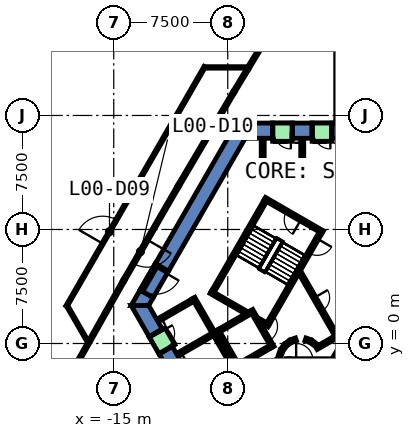
"""IFC4 building model, lengths in metres.
Left out: names, types, materials, properties, quantities, classifications, styles, units other than length and angle.
Written with IfcOpenShell. Run it as: python <this file> out.ifc"""

import sys

from ifc_helpers import new_model, si_unit, direction, frame, frame_2d, origin, place, context, subcontext, project, spatial, polyline, rectangle, outline, extrude, element, fill, save


model = new_model("IFC4")
c1 = context("Model", 3, precision=1e-05, world=origin(), true_north=direction((0.0, 1.0)))
c2 = subcontext(c1, "Body", "Model", "MODEL_VIEW")
j1 = project(units=[si_unit("LENGTHUNIT", "METRE"), si_unit("PLANEANGLEUNIT", "RADIAN")], contexts=[c1])
p1 = place(None, origin())
s1 = spatial("IfcSite", under=j1, at=p1, CompositionType="ELEMENT")
p2 = place(p1, origin())
s2 = spatial("IfcBuilding", under=s1, at=p2, CompositionType="ELEMENT")
p3 = place(p2, origin())
s3 = spatial("IfcBuildingStorey", under=s2, at=p3, CompositionType="ELEMENT", Elevation=0.0)
p4 = place(p3, frame((0.0, 0.0, -0.5)))
e1 = element("IfcWall", 1, at=p4, inside=s3, PredefinedType="SHEAR", context=c2, shape_type="SweptSolid", body=[
    extrude(outline(polyline([(-0.65, 14.5), (-0.65, 13.5), (0.65, 13.5), (0.65, 14.5), (-0.65, 14.5)])), origin(), (0.0, 0.0, 1.0), 9.05),
])
p5 = place(p3, frame((0.0, 0.0, -0.5)))
e2 = element("IfcWall", 2, at=p5, inside=s3, PredefinedType="SHEAR", context=c2, shape_type="SweptSolid", body=[
    extrude(outline(polyline([(-3.25, 14.5), (-3.25, 13.5), (-1.95, 13.5), (-1.95, 14.5), (-3.25, 14.5)])), origin(), (0.0, 0.0, 1.0), 9.05),
])
p6 = place(p3, frame((0.0, 0.0, -0.5)))
e3 = element("IfcWall", 3, at=p6, inside=s3, PredefinedType="SHEAR", context=c2, shape_type="SweptSolid", body=[
    extrude(outline(polyline([(-4.55, 13.5), (-4.55, 14.5), (-6.928, 14.5), (-6.351, 13.5), (-4.55, 13.5)])), origin(), (0.0, 0.0, 1.0), 9.05),
])
p7 = place(p3, frame((0.0, 0.0, 3.6)))
e4 = element("IfcWall", 4, at=p7, inside=s3, PredefinedType="SHEAR", context=c2, shape_type="SweptSolid", body=[
    extrude(outline(polyline([(-1.95, 14.5), (-1.95, 13.5), (-0.65, 13.5), (-0.65, 14.5), (-1.95, 14.5)])), origin(), (0.0, 0.0, 1.0), 4.95),
])
p8 = place(p3, frame((0.0, 0.0, 3.6)))
e5 = element("IfcWall", 5, at=p8, inside=s3, PredefinedType="SHEAR", context=c2, shape_type="SweptSolid", body=[
    extrude(outline(polyline([(-4.55, 14.5), (-4.55, 13.5), (-3.25, 13.5), (-3.25, 14.5), (-4.55, 14.5)])), origin(), (0.0, 0.0, 1.0), 4.95),
])
p9 = place(p3, frame((0.0, 0.0, -0.5)))
e6 = element("IfcWall", 6, at=p9, inside=s3, PredefinedType="SHEAR", context=c2, shape_type="SweptSolid", body=[
    extrude(outline(polyline([(-12.267, 5.252), (-11.402, 4.752), (-6.351, 13.5), (-6.928, 14.5), (-12.267, 5.252)])), origin(), (0.0, 0.0, 1.0), 9.05),
])
p10 = place(p3, frame((0.0, 0.0, -0.5)))
e7 = element("IfcWall", 7, at=p10, inside=s3, PredefinedType="SHEAR", context=c2, shape_type="SweptSolid", body=[
    extrude(outline(polyline([(-12.402, 3.02), (-13.267, 3.52), (-13.856, 2.5), (-12.702, 2.5), (-12.402, 3.02)])), origin(), (0.0, 0.0, 1.0), 9.05),
])
p11 = place(p3, frame((0.0, 0.0, 3.6)))
e8 = element("IfcWall", 8, at=p11, inside=s3, PredefinedType="SHEAR", context=c2, shape_type="SweptSolid", body=[
    extrude(outline(polyline([(-13.267, 3.52), (-12.402, 3.02), (-11.402, 4.752), (-12.267, 5.252), (-13.267, 3.52)])), origin(), (0.0, 0.0, 1.0), 4.95),
])
p12 = place(p3, frame((0.0, 0.0, -0.5)))
e9 = element("IfcWall", 9, at=p12, inside=s3, PredefinedType="SHEAR", context=c2, shape_type="SweptSolid", body=[
    extrude(outline(polyline([(-12.667, 0.44), (-11.801, 0.94), (-12.702, 2.5), (-13.856, 2.5), (-12.667, 0.44)])), origin(), (0.0, 0.0, 1.0), 9.05),
])
p13 = place(p3, frame((0.0, 0.0, -0.5)))
e10 = element("IfcWall", 10, at=p13, inside=s3, PredefinedType="SHEAR", context=c2, shape_type="SweptSolid", body=[
    extrude(outline(polyline([(-11.367, -1.811), (-10.501, -1.311), (-11.151, -0.186), (-12.017, -0.686), (-11.367, -1.811)])), origin(), (0.0, 0.0, 1.0), 9.05),
])
p14 = place(p3, frame((0.0, 0.0, 3.6)))
e11 = element("IfcWall", 11, at=p14, inside=s3, PredefinedType="SHEAR", context=c2, shape_type="SweptSolid", body=[
    extrude(outline(polyline([(-12.017, -0.686), (-11.151, -0.186), (-11.801, 0.94), (-12.667, 0.44), (-12.017, -0.686)])), origin(), (0.0, 0.0, 1.0), 4.95),
])
p15 = place(p3, frame((-5.126, -2.422, 0.0), z_axis=(0.0, 0.0, 1.0), x_axis=(-0.500062241894, 0.865989465428, 0.0)))
e12 = element("IfcWall", 12, at=p15, inside=s3, PredefinedType="PARTITIONING", context=c2, shape_type="SweptSolid", body=[
    extrude(rectangle(XDim=1.7, YDim=0.2, at=frame_2d((0.85, 0.0))), origin(), (0.0, 0.0, 1.0), 8.55),
])
p16 = place(p3, frame((-4.145, -0.92, 0.0), z_axis=(0.0, 0.0, 1.0), x_axis=(0.499743786207, -0.866173278362, 0.0)))
e13 = element("IfcWall", 13, at=p16, inside=s3, PredefinedType="PARTITIONING", context=c2, shape_type="SweptSolid", body=[
    extrude(rectangle(XDim=0.991, YDim=0.2, at=frame_2d((0.495, 0.0))), origin(), (0.0, 0.0, 1.0), 8.55),
])
p17 = place(p3, frame((-0.52, -1.0, 0.0), z_axis=(0.0, 0.0, 1.0), x_axis=(0.50011622646, 0.865958290007, 0.0)))
e14 = element("IfcWall", 14, at=p17, inside=s3, PredefinedType="PARTITIONING", context=c2, shape_type="SweptSolid", body=[
    extrude(rectangle(XDim=4.991, YDim=0.2, at=frame_2d((2.496, 0.0))), origin(), (0.0, 0.0, 1.0), 8.55),
])
p18 = place(p17, frame((1.945, 0.0, 0.0)))
e15 = element("IfcOpeningElement", 15, at=p18, cuts=e14, PredefinedType="OPENING", context=c2, shape_type="SweptSolid", body=[
    extrude(rectangle(XDim=1.0, YDim=2.1, at=frame_2d((0.5, 1.05))), frame((0.0, 0.11, 0.0), z_axis=(0.0, -1.0, 0.0), x_axis=(1.0, 0.0, 0.0)), (0.0, 0.0, 1.0), 0.22),
])
p19 = place(p3, frame((-0.412, 0.414, 0.0), z_axis=(0.0, 0.0, 1.0), x_axis=(-0.866017369001, -0.500013916395, 0.0)))
e16 = element("IfcWall", 16, at=p19, inside=s3, PredefinedType="PARTITIONING", context=c2, shape_type="SweptSolid", body=[
    extrude(rectangle(XDim=1.45, YDim=0.2, at=frame_2d((0.725, 0.0))), origin(), (0.0, 0.0, 1.0), 8.55),
])
p20 = place(p3, frame((-1.731, -0.077, 0.0), z_axis=(0.0, 0.0, 1.0), x_axis=(-0.804311165252, 0.594208338422, 0.0)))
e17 = element("IfcWall", 17, at=p20, inside=s3, PredefinedType="PARTITIONING", context=c2, shape_type="SweptSolid", body=[
    extrude(rectangle(XDim=0.338, YDim=0.2, at=frame_2d((0.169, 0.0))), origin(), (0.0, 0.0, 1.0), 8.55),
])
p21 = place(p3, frame((-2.07, 0.16, 0.0), z_axis=(0.0, 0.0, 1.0), x_axis=(-0.942199461132, 0.335052496547, 0.0)))
e18 = element("IfcWall", 18, at=p21, inside=s3, PredefinedType="PARTITIONING", context=c2, shape_type="SweptSolid", body=[
    extrude(rectangle(XDim=0.337, YDim=0.2, at=frame_2d((0.169, 0.0))), origin(), (0.0, 0.0, 1.0), 8.55),
])
p22 = place(p3, frame((-3.012, 0.273, 0.0), z_axis=(0.0, 0.0, 1.0), x_axis=(-0.942280615813, -0.334824194261, 0.0)))
e19 = element("IfcWall", 19, at=p22, inside=s3, PredefinedType="PARTITIONING", context=c2, shape_type="SweptSolid", body=[
    extrude(rectangle(XDim=0.338, YDim=0.2, at=frame_2d((0.169, 0.0))), origin(), (0.0, 0.0, 1.0), 8.55),
])
p23 = place(p3, frame((-3.397, 0.124, 0.0), z_axis=(0.0, 0.0, 1.0), x_axis=(-0.804311165252, -0.594208338422, 0.0)))
e20 = element("IfcWall", 20, at=p23, inside=s3, PredefinedType="PARTITIONING", context=c2, shape_type="SweptSolid", body=[
    extrude(rectangle(XDim=0.338, YDim=0.2, at=frame_2d((0.169, 0.0))), origin(), (0.0, 0.0, 1.0), 8.55),
])
p24 = place(p3, frame((-3.723, -0.131, 0.0), z_axis=(0.0, 0.0, 1.0), x_axis=(-0.594675113454, -0.803966112121, 0.0)))
e21 = element("IfcWall", 21, at=p24, inside=s3, PredefinedType="PARTITIONING", context=c2, shape_type="SweptSolid", body=[
    extrude(rectangle(XDim=0.338, YDim=0.2, at=frame_2d((0.169, 0.0))), origin(), (0.0, 0.0, 1.0), 8.55),
])
p25 = place(p3, frame((-3.96, -0.47, 0.0), z_axis=(0.0, 0.0, 1.0), x_axis=(-0.334824194261, -0.942280615813, 0.0)))
e22 = element("IfcWall", 22, at=p25, inside=s3, PredefinedType="PARTITIONING", context=c2, shape_type="SweptSolid", body=[
    extrude(rectangle(XDim=0.338, YDim=0.2, at=frame_2d((0.169, 0.0))), origin(), (0.0, 0.0, 1.0), 8.55),
])
p26 = place(p3, frame((-2.771, 4.7, 0.0), z_axis=(0.0, 0.0, 1.0), x_axis=(0.499969479948, -0.866043023828, 0.0)))
e23 = element("IfcWall", 23, at=p26, inside=s3, PredefinedType="PARTITIONING", context=c2, shape_type="SweptSolid", body=[
    extrude(rectangle(XDim=4.99, YDim=0.2, at=frame_2d((2.495, 0.0))), origin(), (0.0, 0.0, 1.0), 8.55),
])
p27 = place(p26, frame((1.945, 0.0, 0.0)))
e24 = element("IfcOpeningElement", 24, at=p27, cuts=e23, PredefinedType="OPENING", context=c2, shape_type="SweptSolid", body=[
    extrude(rectangle(XDim=1.0, YDim=2.1, at=frame_2d((0.5, 1.05))), frame((0.0, 0.11, 0.0), z_axis=(0.0, -1.0, 0.0), x_axis=(1.0, 0.0, 0.0)), (0.0, 0.0, 1.0), 0.22),
])
p28 = place(p3, frame((-16.697, 0.101, 0.0), z_axis=(0.0, 0.0, 1.0), x_axis=(-0.499903734186, 0.866080975745, 0.0)))
e25 = element("IfcWall", 25, at=p28, inside=s3, PredefinedType="PARTITIONING", context=c2, shape_type="SweptSolid", body=[
    extrude(rectangle(XDim=2.72, YDim=0.1, at=frame_2d((1.36, 0.0))), origin(), (0.0, 0.0, 1.0), 8.55),
])
p29 = place(p3, frame((-18.107, 2.457, 0.0), z_axis=(0.0, 0.0, 1.0), x_axis=(0.499997929316, 0.866026599291, 0.0)))
e26 = element("IfcWall", 26, at=p29, inside=s3, PredefinedType="PARTITIONING", context=c2, shape_type="SweptSolid", body=[
    extrude(rectangle(XDim=18.182, YDim=0.1, at=frame_2d((9.091, 0.0))), origin(), (0.0, 0.0, 1.0), 8.55),
])
p30 = place(p29, frame((4.754, 0.0, 0.0)))
e27 = element("IfcOpeningElement", 27, at=p30, cuts=e26, PredefinedType="OPENING", context=c2, shape_type="SweptSolid", body=[
    extrude(rectangle(XDim=1.8, YDim=2.1, at=frame_2d((0.9, 1.05))), frame((0.0, 0.06, 0.0), z_axis=(0.0, -1.0, 0.0), x_axis=(1.0, 0.0, 0.0)), (0.0, 0.0, 1.0), 0.12),
])
p31 = place(p3, frame((-8.991, 18.16, 0.0), z_axis=(0.0, 0.0, 1.0), x_axis=(1.0, 0.0, 0.0)))
e28 = element("IfcWall", 28, at=p31, inside=s3, PredefinedType="PARTITIONING", context=c2, shape_type="SweptSolid", body=[
    extrude(rectangle(XDim=2.865, YDim=0.1, at=frame_2d((1.433, 0.0))), origin(), (0.0, 0.0, 1.0), 8.55),
])
p32 = place(p3, frame((-10.755, 10.354, 0.0), z_axis=(0.0, 0.0, 1.0), x_axis=(-0.49996876383, -0.866043437245, 0.0)))
e29 = element("IfcWall", 29, at=p32, inside=s3, PredefinedType="PARTITIONING", context=c2, shape_type="SweptSolid", body=[
    extrude(rectangle(XDim=7.179, YDim=0.15, at=frame_2d((3.589, 0.0))), origin(), (0.0, 0.0, 1.0), 8.55),
])
p33 = place(p32, frame((4.079, 0.0, 0.0)))
e30 = element("IfcOpeningElement", 30, at=p33, cuts=e29, PredefinedType="OPENING", context=c2, shape_type="SweptSolid", body=[
    extrude(rectangle(XDim=1.8, YDim=2.1, at=frame_2d((0.9, 1.05))), frame((0.0, 0.085, 0.0), z_axis=(0.0, -1.0, 0.0), x_axis=(1.0, 0.0, 0.0)), (0.0, 0.0, 1.0), 0.17),
])
p34 = place(p3, frame((-6.165, 18.096, 0.0), z_axis=(0.0, 0.0, 1.0), x_axis=(-0.516449409386, -0.856317702459, 0.0)))
e31 = element("IfcWall", 31, at=p34, inside=s3, PredefinedType="PARTITIONING", context=c2, shape_type="SweptSolid", body=[
    extrude(rectangle(XDim=1.818, YDim=0.15, at=frame_2d((0.909, 0.0))), origin(), (0.0, 0.0, 1.0), 8.55),
])
p35 = place(p3, frame((-7.104, 16.539, 0.0), z_axis=(0.0, 0.0, 1.0), x_axis=(-0.508323844405, -0.861165993992, 0.0)))
e32 = element("IfcWall", 32, at=p35, inside=s3, PredefinedType="PARTITIONING", context=c2, shape_type="SweptSolid", body=[
    extrude(rectangle(XDim=7.182, YDim=0.15, at=frame_2d((3.591, 0.0))), origin(), (0.0, 0.0, 1.0), 8.55),
])
p36 = place(p3, frame((-14.344, 4.137, 0.0), z_axis=(0.0, 0.0, 1.0), x_axis=(-0.491655071834, -0.870790038035, 0.0)))
e33 = element("IfcWall", 33, at=p36, inside=s3, PredefinedType="PARTITIONING", context=c2, shape_type="SweptSolid", body=[
    extrude(rectangle(XDim=7.182, YDim=0.15, at=frame_2d((3.591, 0.0))), origin(), (0.0, 0.0, 1.0), 8.55),
])
p37 = place(p3, frame((-3.394, 22.687, 0.0), z_axis=(0.0, 0.0, 1.0), x_axis=(-0.516736893328, -0.856144253659, 0.0)))
e34 = element("IfcWall", 34, at=p37, inside=s3, PredefinedType="PARTITIONING", context=c2, shape_type="SweptSolid", body=[
    extrude(rectangle(XDim=5.363, YDim=0.15, at=frame_2d((2.681, 0.0))), origin(), (0.0, 0.0, 1.0), 8.55),
])
p38 = place(p3, frame((-12.18, 5.202, 0.0), z_axis=(0.0, 0.0, 1.0), x_axis=(-0.50002537861, -0.866010750942, 0.0)))
e35 = element("IfcWall", 35, at=p38, inside=s3, PredefinedType="PARTITIONING", context=c2, shape_type="SweptSolid", body=[
    extrude(rectangle(XDim=2.0, YDim=0.2, at=frame_2d((1.0, 0.0))), origin(), (0.0, 0.0, 1.0), 2.4),
])
p39 = place(p38, frame((0.19, 0.0, 0.0)))
e36 = element("IfcOpeningElement", 36, at=p39, cuts=e35, PredefinedType="OPENING", context=c2, shape_type="SweptSolid", body=[
    extrude(rectangle(XDim=1.8, YDim=2.1, at=frame_2d((0.9, 1.05))), frame((0.0, 0.11, 0.0), z_axis=(0.0, -1.0, 0.0), x_axis=(1.0, 0.0, 0.0)), (0.0, 0.0, 1.0), 0.22),
])
p40 = place(p3, frame((5.3, 10.7, 0.0), z_axis=(0.0, 0.0, 1.0), x_axis=(-1.0, 0.0, 0.0)))
e37 = element("IfcWall", 37, at=p40, inside=s3, PredefinedType="STANDARD", context=c2, shape_type="SweptSolid", body=[
    extrude(rectangle(XDim=10.6, YDim=0.2, at=frame_2d((5.3, 0.0))), origin(), (0.0, 0.0, 1.0), 8.55),
])
for number, where, z_axis, x_axis in (
    (38, (-2.6, 10.8, 0.0), (0.0, 0.0, 1.0), (0.0, 1.0, 0.0)),
    (39, (-5.2, 10.8, 0.0), (0.0, 0.0, 1.0), (0.0, 1.0, 0.0)),
):
    element("IfcWall", number, at=place(p3, frame(where, z_axis=z_axis, x_axis=x_axis)), inside=s3, PredefinedType="STANDARD", context=c2, shape_type="SweptSolid", body=[
        extrude(rectangle(XDim=2.5, YDim=0.2, at=frame_2d((1.25, 0.0))), origin(), (0.0, 0.0, 1.0), 8.55),
    ])
p41 = place(p3, frame((-5.94, 2.188, 0.0), z_axis=(0.0, 0.0, 1.0), x_axis=(0.49994636267, -0.866056369097, 0.0)))
e40 = element("IfcWall", 40, at=p41, inside=s3, PredefinedType="STANDARD", context=c2, shape_type="SweptSolid", body=[
    extrude(rectangle(XDim=2.8, YDim=0.2, at=frame_2d((1.4, 0.0))), origin(), (0.0, 0.0, 1.0), 8.55),
])
p42 = place(p41, frame((1.225, 0.0, 0.0)))
e41 = element("IfcOpeningElement", 41, at=p42, cuts=e40, PredefinedType="OPENING", context=c2, shape_type="SweptSolid", body=[
    extrude(rectangle(XDim=1.1, YDim=2.1, at=frame_2d((0.55, 1.05))), frame((0.0, 0.11, 0.0), z_axis=(0.0, -1.0, 0.0), x_axis=(1.0, 0.0, 0.0)), (0.0, 0.0, 1.0), 0.22),
])
p43 = place(p3, frame((-8.192, 0.888, 0.0), z_axis=(0.0, 0.0, 1.0), x_axis=(0.49994636267, -0.866056369097, 0.0)))
e42 = element("IfcWall", 42, at=p43, inside=s3, PredefinedType="STANDARD", context=c2, shape_type="SweptSolid", body=[
    extrude(rectangle(XDim=2.8, YDim=0.2, at=frame_2d((1.4, 0.0))), origin(), (0.0, 0.0, 1.0), 8.55),
])
for number, where, z_axis, x_axis in (
    (43, (-5.977, 2.052, 0.0), (0.0, 0.0, 1.0), (-0.866, -0.5, 0.0)),
    (44, (-4.677, -0.2, 0.0), (0.0, 0.0, 1.0), (-0.866, -0.5, 0.0)),
):
    element("IfcWall", number, at=place(p3, frame(where, z_axis=z_axis, x_axis=x_axis)), inside=s3, PredefinedType="STANDARD", context=c2, shape_type="SweptSolid", body=[
        extrude(rectangle(XDim=2.399, YDim=0.2, at=frame_2d((1.2, 0.0))), origin(), (0.0, 0.0, 1.0), 8.55),
    ])
p44 = place(p3, frame((-9.751, 2.99, 0.0), z_axis=(0.0, 0.0, 1.0), x_axis=(0.50000090737, -0.866024879913, 0.0)))
e45 = element("IfcWall", 45, at=p44, inside=s3, PredefinedType="STANDARD", context=c2, shape_type="SweptSolid", body=[
    extrude(rectangle(XDim=10.6, YDim=0.2, at=frame_2d((5.3, 0.0))), origin(), (0.0, 0.0, 1.0), 8.55),
])
p45 = place(p3, frame((-9.788, 2.853, 0.0), z_axis=(0.0, 0.0, 1.0), x_axis=(-0.865998541277, -0.500046524342, 0.0)))
e46 = element("IfcWall", 46, at=p45, inside=s3, PredefinedType="STANDARD", context=c2, shape_type="SweptSolid", body=[
    extrude(rectangle(XDim=2.5, YDim=0.2, at=frame_2d((1.25, 0.0))), origin(), (0.0, 0.0, 1.0), 8.55),
])
p46 = place(p3, frame((-8.488, 0.602, 0.0), z_axis=(0.0, 0.0, 1.0), x_axis=(-0.866022959057, -0.500004234368, 0.0)))
e47 = element("IfcWall", 47, at=p46, inside=s3, PredefinedType="STANDARD", context=c2, shape_type="SweptSolid", body=[
    extrude(rectangle(XDim=2.5, YDim=0.2, at=frame_2d((1.25, 0.0))), origin(), (0.0, 0.0, 1.0), 8.55),
])
p47 = place(p3, frame((-0.65, 13.9, 0.0), z_axis=(0.0, 0.0, 1.0), x_axis=(-1.0, 0.0, 0.0)))
e48 = element("IfcWall", 48, at=p47, inside=s3, PredefinedType="STANDARD", context=c2, shape_type="SweptSolid", body=[
    extrude(rectangle(XDim=1.3, YDim=1.2, at=frame_2d((0.65, 0.0))), origin(), (0.0, 0.0, 1.0), 2.4),
])
p48 = place(p47, frame((0.1, 0.0, 0.0)))
e49 = element("IfcOpeningElement", 49, at=p48, cuts=e48, PredefinedType="OPENING", context=c2, shape_type="SweptSolid", body=[
    extrude(rectangle(XDim=1.1, YDim=2.3, at=frame_2d((0.55, 1.15))), frame((0.0, 0.61, 0.0), z_axis=(0.0, -1.0, 0.0), x_axis=(1.0, 0.0, 0.0)), (0.0, 0.0, 1.0), 1.22),
])
p49 = place(p3, frame((-3.25, 13.9, 0.0), z_axis=(0.0, 0.0, 1.0), x_axis=(-1.0, 0.0, 0.0)))
e50 = element("IfcWall", 50, at=p49, inside=s3, PredefinedType="STANDARD", context=c2, shape_type="SweptSolid", body=[
    extrude(rectangle(XDim=1.3, YDim=1.2, at=frame_2d((0.65, 0.0))), origin(), (0.0, 0.0, 1.0), 2.4),
])
p50 = place(p49, frame((0.1, 0.0, 0.0)))
e51 = element("IfcOpeningElement", 51, at=p50, cuts=e50, PredefinedType="OPENING", context=c2, shape_type="SweptSolid", body=[
    extrude(rectangle(XDim=1.1, YDim=2.3, at=frame_2d((0.55, 1.15))), frame((0.0, 0.61, 0.0), z_axis=(0.0, -1.0, 0.0), x_axis=(1.0, 0.0, 0.0)), (0.0, 0.0, 1.0), 1.22),
])
p51 = place(p3, frame((-12.148, 0.74, 0.0), z_axis=(0.0, 0.0, 1.0), x_axis=(0.500221244143, -0.865897630733, 0.0)))
e52 = element("IfcWall", 52, at=p51, inside=s3, PredefinedType="STANDARD", context=c2, shape_type="SweptSolid", body=[
    extrude(rectangle(XDim=1.299, YDim=1.2, at=frame_2d((0.65, 0.0))), origin(), (0.0, 0.0, 1.0), 2.4),
])
p52 = place(p51, frame((0.1, 0.0, 0.0)))
e53 = element("IfcOpeningElement", 53, at=p52, cuts=e52, PredefinedType="OPENING", context=c2, shape_type="SweptSolid", body=[
    extrude(rectangle(XDim=1.1, YDim=2.3, at=frame_2d((0.55, 1.15))), frame((0.0, 0.61, 0.0), z_axis=(0.0, -1.0, 0.0), x_axis=(1.0, 0.0, 0.0)), (0.0, 0.0, 1.0), 1.22),
])
p53 = place(p3, frame((-1.256, 7.324, 0.0), z_axis=(0.0, 0.0, 1.0), x_axis=(-0.866046073146, 0.499964197906, 0.0)))
e54 = element("IfcWall", 54, at=p53, inside=s3, PredefinedType="STANDARD", context=c2, shape_type="SweptSolid", body=[
    extrude(rectangle(XDim=4.4, YDim=0.2, at=frame_2d((2.2, 0.0))), origin(), (0.0, 0.0, 1.0), 8.55),
])
p54 = place(p53, frame((1.65, 0.0, 0.0)))
e55 = element("IfcOpeningElement", 55, at=p54, cuts=e54, PredefinedType="OPENING", context=c2, shape_type="SweptSolid", body=[
    extrude(rectangle(XDim=1.1, YDim=2.2, at=frame_2d((0.55, 1.1))), frame((0.0, 0.11, 0.0), z_axis=(0.0, -1.0, 0.0), x_axis=(1.0, 0.0, 0.0)), (0.0, 0.0, 1.0), 0.22),
])
p55 = place(p3, frame((-6.25, 2.01, 0.0), z_axis=(0.0, 0.0, 1.0), x_axis=(-0.86611865017, 0.499838457731, 0.0)))
e56 = element("IfcWall", 56, at=p55, inside=s3, PredefinedType="STANDARD", context=c2, shape_type="SweptSolid", body=[
    extrude(rectangle(XDim=2.733, YDim=0.2, at=frame_2d((1.366, 0.0))), origin(), (0.0, 0.0, 1.0), 8.55),
])
p56 = place(p3, frame((-4.806, 1.176, 0.0), z_axis=(0.0, 0.0, 1.0), x_axis=(-0.866558586415, 0.499075361355, 0.0)))
e57 = element("IfcWall", 57, at=p56, inside=s3, PredefinedType="STANDARD", context=c2, shape_type="SweptSolid", body=[
    extrude(rectangle(XDim=0.751, YDim=0.2, at=frame_2d((0.376, 0.0))), origin(), (0.0, 0.0, 1.0), 8.55),
])
p57 = place(p3, frame((-1.393, 7.288, 0.0), z_axis=(0.0, 0.0, 1.0), x_axis=(-0.499963383562, -0.866046543262, 0.0)))
e58 = element("IfcWall", 58, at=p57, inside=s3, PredefinedType="STANDARD", context=c2, shape_type="SweptSolid", body=[
    extrude(rectangle(XDim=6.9, YDim=0.2, at=frame_2d((3.45, 0.0))), origin(), (0.0, 0.0, 1.0), 8.55),
])
p58 = place(p57, frame((0.45, 0.0, 0.0)))
e59 = element("IfcOpeningElement", 59, at=p58, cuts=e58, PredefinedType="OPENING", context=c2, shape_type="SweptSolid", body=[
    extrude(rectangle(XDim=1.1, YDim=2.2, at=frame_2d((0.55, 1.1))), frame((0.0, 0.11, 0.0), z_axis=(0.0, -1.0, 0.0), x_axis=(1.0, 0.0, 0.0)), (0.0, 0.0, 1.0), 0.22),
])
p59 = place(p3, frame((-5.03, 9.388, 0.0), z_axis=(0.0, 0.0, 1.0), x_axis=(-0.499978703459, -0.866037698999, 0.0)))
e60 = element("IfcWall", 60, at=p59, inside=s3, PredefinedType="STANDARD", context=c2, shape_type="SweptSolid", body=[
    extrude(rectangle(XDim=6.9, YDim=0.2, at=frame_2d((3.45, 0.0))), origin(), (0.0, 0.0, 1.0), 8.55),
])
p60 = place(p30, origin())
e61 = element("IfcDoor", 61, at=p60, inside=s3, OperationType="DOUBLE_DOOR_SINGLE_SWING", PredefinedType="DOOR", context=c2, shape_type="SweptSolid", body=[
    extrude(rectangle(XDim=1.8, YDim=2.1, at=frame_2d((0.9, 1.05))), frame((0.0, 0.025, 0.0), z_axis=(0.0, -1.0, 0.0), x_axis=(1.0, 0.0, 0.0)), (0.0, 0.0, 1.0), 0.05),
])
fill(e27, e61)
p61 = place(p33, origin())
e62 = element("IfcDoor", 62, at=p61, inside=s3, OperationType="DOUBLE_DOOR_SINGLE_SWING", PredefinedType="DOOR", context=c2, shape_type="SweptSolid", body=[
    extrude(rectangle(XDim=1.8, YDim=2.1, at=frame_2d((0.9, 1.05))), frame((0.0, 0.025, 0.0), z_axis=(0.0, -1.0, 0.0), x_axis=(1.0, 0.0, 0.0)), (0.0, 0.0, 1.0), 0.05),
])
fill(e30, e62)
p62 = place(p27, origin())
e63 = element("IfcDoor", 63, at=p62, inside=s3, OperationType="SINGLE_SWING_RIGHT", PredefinedType="DOOR", context=c2, shape_type="SweptSolid", body=[
    extrude(rectangle(XDim=1.0, YDim=2.1, at=frame_2d((0.5, 1.05))), frame((0.0, 0.025, 0.0), z_axis=(0.0, -1.0, 0.0), x_axis=(1.0, 0.0, 0.0)), (0.0, 0.0, 1.0), 0.05),
])
fill(e24, e63)
p63 = place(p39, origin())
e64 = element("IfcDoor", 64, at=p63, inside=s3, OperationType="DOUBLE_DOOR_SINGLE_SWING", PredefinedType="DOOR", context=c2, shape_type="SweptSolid", body=[
    extrude(rectangle(XDim=1.8, YDim=2.1, at=frame_2d((0.9, 1.05))), frame((0.0, 0.025, 0.0), z_axis=(0.0, -1.0, 0.0), x_axis=(1.0, 0.0, 0.0)), (0.0, 0.0, 1.0), 0.05),
])
fill(e36, e64)
p64 = place(p48, origin())
e65 = element("IfcDoor", 65, at=p64, inside=s3, OperationType="SLIDING_TO_LEFT", PredefinedType="DOOR", context=c2, shape_type="SweptSolid", body=[
    extrude(rectangle(XDim=1.1, YDim=2.3, at=frame_2d((0.55, 1.15))), frame((0.0, 0.025, 0.0), z_axis=(0.0, -1.0, 0.0), x_axis=(1.0, 0.0, 0.0)), (0.0, 0.0, 1.0), 0.05),
])
fill(e49, e65)
p65 = place(p50, origin())
e66 = element("IfcDoor", 66, at=p65, inside=s3, OperationType="SLIDING_TO_LEFT", PredefinedType="DOOR", context=c2, shape_type="SweptSolid", body=[
    extrude(rectangle(XDim=1.1, YDim=2.3, at=frame_2d((0.55, 1.15))), frame((0.0, 0.025, 0.0), z_axis=(0.0, -1.0, 0.0), x_axis=(1.0, 0.0, 0.0)), (0.0, 0.0, 1.0), 0.05),
])
fill(e51, e66)
p66 = place(p52, origin())
e67 = element("IfcDoor", 67, at=p66, inside=s3, OperationType="SLIDING_TO_LEFT", PredefinedType="DOOR", context=c2, shape_type="SweptSolid", body=[
    extrude(rectangle(XDim=1.1, YDim=2.3, at=frame_2d((0.55, 1.15))), frame((0.0, 0.025, 0.0), z_axis=(0.0, -1.0, 0.0), x_axis=(1.0, 0.0, 0.0)), (0.0, 0.0, 1.0), 0.05),
])
fill(e53, e67)
p67 = place(p42, origin())
e68 = element("IfcDoor", 68, at=p67, inside=s3, OperationType="SLIDING_TO_LEFT", PredefinedType="DOOR", context=c2, shape_type="SweptSolid", body=[
    extrude(rectangle(XDim=1.1, YDim=2.1, at=frame_2d((0.55, 1.05))), frame((0.0, 0.025, 0.0), z_axis=(0.0, -1.0, 0.0), x_axis=(1.0, 0.0, 0.0)), (0.0, 0.0, 1.0), 0.05),
])
fill(e41, e68)
p68 = place(p58, origin())
e69 = element("IfcDoor", 69, at=p68, inside=s3, OperationType="SINGLE_SWING_LEFT", PredefinedType="DOOR", context=c2, shape_type="SweptSolid", body=[
    extrude(rectangle(XDim=1.1, YDim=2.2, at=frame_2d((0.55, 1.1))), frame((0.0, 0.025, 0.0), z_axis=(0.0, -1.0, 0.0), x_axis=(1.0, 0.0, 0.0)), (0.0, 0.0, 1.0), 0.05),
])
fill(e59, e69)
p69 = place(p54, origin())
e70 = element("IfcDoor", 70, at=p69, inside=s3, OperationType="SINGLE_SWING_LEFT", PredefinedType="DOOR", context=c2, shape_type="SweptSolid", body=[
    extrude(rectangle(XDim=1.1, YDim=2.2, at=frame_2d((0.55, 1.1))), frame((0.0, 0.025, 0.0), z_axis=(0.0, -1.0, 0.0), x_axis=(1.0, 0.0, 0.0)), (0.0, 0.0, 1.0), 0.05),
])
fill(e55, e70)
save(model, sys.argv[1])
